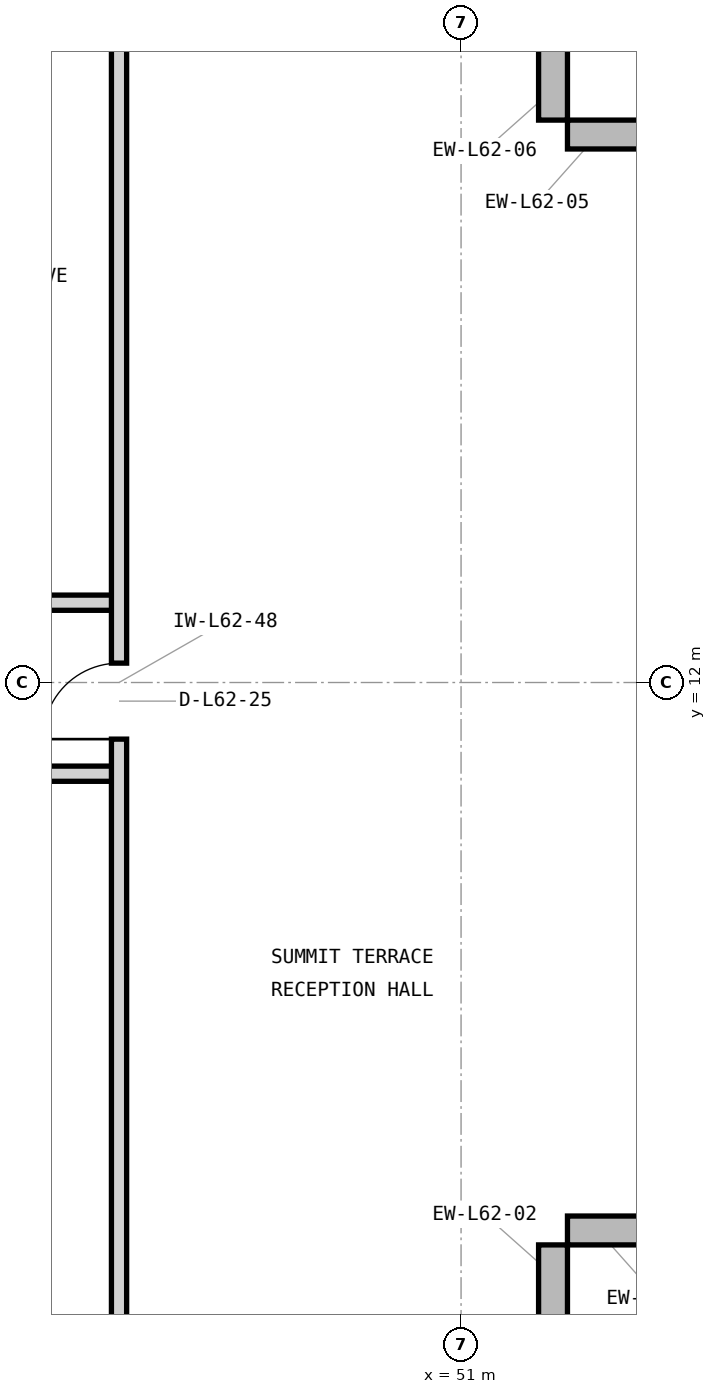
"""IFC4 building model, lengths in metres.
Left out: names, types, materials, properties, quantities, classifications, styles, units other than length and angle.
Written with IfcOpenShell. Run it as: python <this file> out.ifc"""

import sys

from ifc_helpers import new_model, si_unit, direction, frame, frame_2d, origin, place, context, subcontext, project, spatial, rectangle, extrude, element, fill, save


model = new_model("IFC4")
c1 = context("Model", 3, precision=1e-05, world=origin(), true_north=direction((0.0, 1.0)))
c2 = subcontext(c1, "Body", "Model", "MODEL_VIEW")
j1 = project(units=[si_unit("LENGTHUNIT", "METRE"), si_unit("PLANEANGLEUNIT", "RADIAN")], contexts=[c1])
p1 = place(None, origin())
s1 = spatial("IfcSite", under=j1, at=p1, CompositionType="ELEMENT")
p2 = place(p1, origin())
s2 = spatial("IfcBuilding", under=s1, at=p2, CompositionType="ELEMENT")
p3 = place(p2, frame((0.0, 0.0, 254.7)))
s3 = spatial("IfcBuildingStorey", under=s2, at=p3, CompositionType="ELEMENT", Elevation=254.7)
for number, where, z_axis, x_axis in (
    (1, (52.21, 3.0, 0.0), (0.0, 0.0, 1.0), (0.0, 1.0, 0.0)),
    (2, (52.4, 4.79, 0.0), (0.0, 0.0, 1.0), (1.0, 0.0, 0.0)),
    (3, (54.0, 19.21, 0.0), (0.0, 0.0, 1.0), (-1.0, 0.0, 0.0)),
    (4, (52.21, 19.4, 0.0), (0.0, 0.0, 1.0), (0.0, 1.0, 0.0)),
):
    element("IfcWall", number, at=place(p3, frame(where, z_axis=z_axis, x_axis=x_axis)), inside=s3, PredefinedType="STANDARD", context=c2, shape_type="SweptSolid", body=[
        extrude(rectangle(XDim=1.6, YDim=0.38, at=frame_2d((0.8, 0.0))), origin(), (0.0, 0.0, 1.0), 3.715),
    ])
p4 = place(p3, frame((42.2, 10.8, 0.0), z_axis=(0.0, 0.0, 1.0), x_axis=(1.0, 0.0, 0.0)))
e5 = element("IfcWall", 5, at=p4, inside=s3, PredefinedType="PARTITIONING", context=c2, shape_type="SweptSolid", body=[
    extrude(rectangle(XDim=4.3, YDim=0.2, at=frame_2d((2.15, 0.0))), origin(), (0.0, 0.0, 1.0), 3.705),
])
p5 = place(p4, frame((1.4, 0.0, 0.0)))
e6 = element("IfcOpeningElement", 6, at=p5, cuts=e5, PredefinedType="OPENING", context=c2, shape_type="SweptSolid", body=[
    extrude(rectangle(XDim=1.5, YDim=2.3, at=frame_2d((0.75, 1.15))), frame((0.0, 0.11, 0.0), z_axis=(0.0, -1.0, 0.0), x_axis=(1.0, 0.0, 0.0)), (0.0, 0.0, 1.0), 0.22),
])
p6 = place(p3, frame((42.7, 13.05, 0.0), z_axis=(0.0, 0.0, 1.0), x_axis=(1.0, 0.0, 0.0)))
e7 = element("IfcWall", 7, at=p6, inside=s3, PredefinedType="PARTITIONING", context=c2, shape_type="SweptSolid", body=[
    extrude(rectangle(XDim=3.8, YDim=0.2, at=frame_2d((1.9, 0.0))), origin(), (0.0, 0.0, 1.0), 3.705),
])
p7 = place(p6, frame((1.4, 0.0, 0.0)))
e8 = element("IfcOpeningElement", 8, at=p7, cuts=e7, PredefinedType="OPENING", context=c2, shape_type="SweptSolid", body=[
    extrude(rectangle(XDim=1.0, YDim=2.15, at=frame_2d((0.5, 1.075))), frame((0.0, 0.11, 0.0), z_axis=(0.0, -1.0, 0.0), x_axis=(1.0, 0.0, 0.0)), (0.0, 0.0, 1.0), 0.22),
])
p8 = place(p3, frame((46.5, 3.18, 0.0), z_axis=(0.0, 0.0, 1.0), x_axis=(0.0, 1.0, 0.0)))
e9 = element("IfcWall", 9, at=p8, inside=s3, PredefinedType="PARTITIONING", context=c2, shape_type="SweptSolid", body=[
    extrude(rectangle(XDim=17.64, YDim=0.2, at=frame_2d((8.82, 0.0))), origin(), (0.0, 0.0, 1.0), 3.705),
])
p9 = place(p8, frame((8.075, 0.0, 0.0)))
e10 = element("IfcOpeningElement", 10, at=p9, cuts=e9, PredefinedType="OPENING", context=c2, shape_type="SweptSolid", body=[
    extrude(rectangle(XDim=1.0, YDim=2.15, at=frame_2d((0.5, 1.075))), frame((0.0, 0.11, 0.0), z_axis=(0.0, -1.0, 0.0), x_axis=(1.0, 0.0, 0.0)), (0.0, 0.0, 1.0), 0.22),
])
p10 = place(p9, origin())
e11 = element("IfcDoor", 11, at=p10, inside=s3, OperationType="SINGLE_SWING_LEFT", PredefinedType="DOOR", context=c2, shape_type="SweptSolid", body=[
    extrude(rectangle(XDim=1.0, YDim=2.15, at=frame_2d((0.5, 1.075))), frame((0.0, 0.025, 0.0), z_axis=(0.0, -1.0, 0.0), x_axis=(1.0, 0.0, 0.0)), (0.0, 0.0, 1.0), 0.05),
])
fill(e10, e11)
save(model, sys.argv[1])
